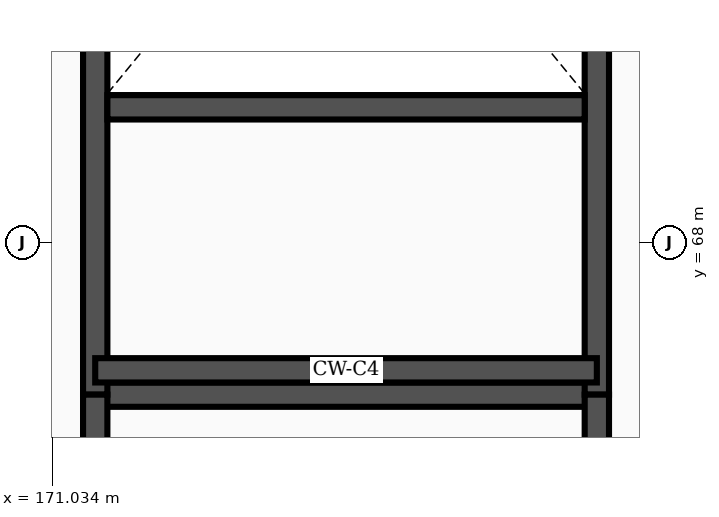
"""IFC4 building model, lengths in metres.
Left out: names, types, materials, properties, quantities, classifications, styles, units other than length and angle.
Written with IfcOpenShell. Run it as: python <this file> out.ifc"""

import sys

from ifc_helpers import new_model, si_unit, direction, frame, frame_2d, origin, place, context, subcontext, project, spatial, rectangle, extrude, element, save


model = new_model("IFC4")
c1 = context("Model", 3, precision=1e-05, world=origin(), true_north=direction((0.0, 1.0)))
c2 = subcontext(c1, "Body", "Model", "MODEL_VIEW")
j1 = project(units=[si_unit("LENGTHUNIT", "METRE"), si_unit("PLANEANGLEUNIT", "RADIAN")], contexts=[c1])
p1 = place(None, origin())
s1 = spatial("IfcSite", under=j1, at=p1, CompositionType="ELEMENT")
p2 = place(p1, origin())
s2 = spatial("IfcBuilding", under=s1, at=p2, CompositionType="ELEMENT")
p3 = place(p2, frame((0.0, 0.0, 33.3)))
s3 = spatial("IfcBuildingStorey", under=s2, at=p3, CompositionType="ELEMENT", Elevation=33.3)
p4 = place(p3, frame((171.6, 66.0, 0.0), z_axis=(0.0, 0.0, 1.0), x_axis=(1.0, 0.0, 0.0)))
e1 = element("IfcWall", 1, at=p4, inside=s3, PredefinedType="SHEAR", context=c2, shape_type="SweptSolid", body=[
    extrude(rectangle(XDim=6.6, YDim=0.32, at=frame_2d((3.3, 0.0))), origin(), (0.0, 0.0, 1.0), 4.255),
])
p5 = place(p3, frame((171.6, 66.0, 0.0), z_axis=(0.0, 0.0, 1.0), x_axis=(0.0, 1.0, 0.0)))
e2 = element("IfcWall", 2, at=p5, inside=s3, PredefinedType="SHEAR", context=c2, shape_type="SweptSolid", body=[
    extrude(rectangle(XDim=14.6, YDim=0.32, at=frame_2d((7.3, 0.0))), origin(), (0.0, 0.0, 1.0), 4.255),
])
p6 = place(p3, frame((178.2, 66.0, 0.0), z_axis=(0.0, 0.0, 1.0), x_axis=(0.0, 1.0, 0.0)))
e3 = element("IfcWall", 3, at=p6, inside=s3, PredefinedType="SHEAR", context=c2, shape_type="SweptSolid", body=[
    extrude(rectangle(XDim=14.6, YDim=0.32, at=frame_2d((7.3, 0.0))), origin(), (0.0, 0.0, 1.0), 4.255),
])
p7 = place(p6, frame((11.65, 0.0, 0.0)))
e4 = element("IfcOpeningElement", 4, at=p7, cuts=e3, PredefinedType="OPENING", context=c2, shape_type="SweptSolid", body=[
    extrude(rectangle(XDim=2.4, YDim=2.25, at=frame_2d((1.2, 1.125))), frame((0.0, 0.172, 0.0), z_axis=(0.0, -1.0, 0.0), x_axis=(1.0, 0.0, 0.0)), (0.0, 0.0, 1.0), 0.344),
])
p8 = place(p3, frame((171.76, 69.78, 0.0), z_axis=(0.0, 0.0, 1.0), x_axis=(1.0, 0.0, 0.0)))
e5 = element("IfcWall", 5, at=p8, inside=s3, PredefinedType="SHEAR", context=c2, shape_type="SweptSolid", body=[
    extrude(rectangle(XDim=6.28, YDim=0.32, at=frame_2d((3.14, 0.0))), origin(), (0.0, 0.0, 1.0), 4.255),
])
p9 = place(p3, frame((171.6, 66.32, 0.0), z_axis=(0.0, 0.0, 1.0), x_axis=(1.0, 0.0, 0.0)))
e6 = element("IfcWall", 6, at=p9, inside=s3, PredefinedType="SHEAR", context=c2, shape_type="SweptSolid", body=[
    extrude(rectangle(XDim=6.6, YDim=0.32, at=frame_2d((3.3, 0.0))), origin(), (0.0, 0.0, 1.0), 4.255),
])
p10 = place(p3, frame((171.6, 54.0, 0.0), z_axis=(0.0, 0.0, 1.0), x_axis=(0.0, 1.0, 0.0)))
e7 = element("IfcWall", 7, at=p10, inside=s3, PredefinedType="SHEAR", context=c2, shape_type="SweptSolid", body=[
    extrude(rectangle(XDim=12.0, YDim=0.32, at=frame_2d((6.0, 0.0))), origin(), (0.0, 0.0, 1.0), 4.255),
])
p11 = place(p3, frame((178.2, 54.0, 0.0), z_axis=(0.0, 0.0, 1.0), x_axis=(0.0, 1.0, 0.0)))
e8 = element("IfcWall", 8, at=p11, inside=s3, PredefinedType="SHEAR", context=c2, shape_type="SweptSolid", body=[
    extrude(rectangle(XDim=12.0, YDim=0.32, at=frame_2d((6.0, 0.0))), origin(), (0.0, 0.0, 1.0), 4.255),
])
p12 = place(p11, frame((0.55, 0.0, 0.0)))
e9 = element("IfcOpeningElement", 9, at=p12, cuts=e8, PredefinedType="OPENING", context=c2, shape_type="SweptSolid", body=[
    extrude(rectangle(XDim=2.4, YDim=2.25, at=frame_2d((1.2, 1.125))), frame((0.0, 0.172, 0.0), z_axis=(0.0, -1.0, 0.0), x_axis=(1.0, 0.0, 0.0)), (0.0, 0.0, 1.0), 0.344),
])
save(model, sys.argv[1])
